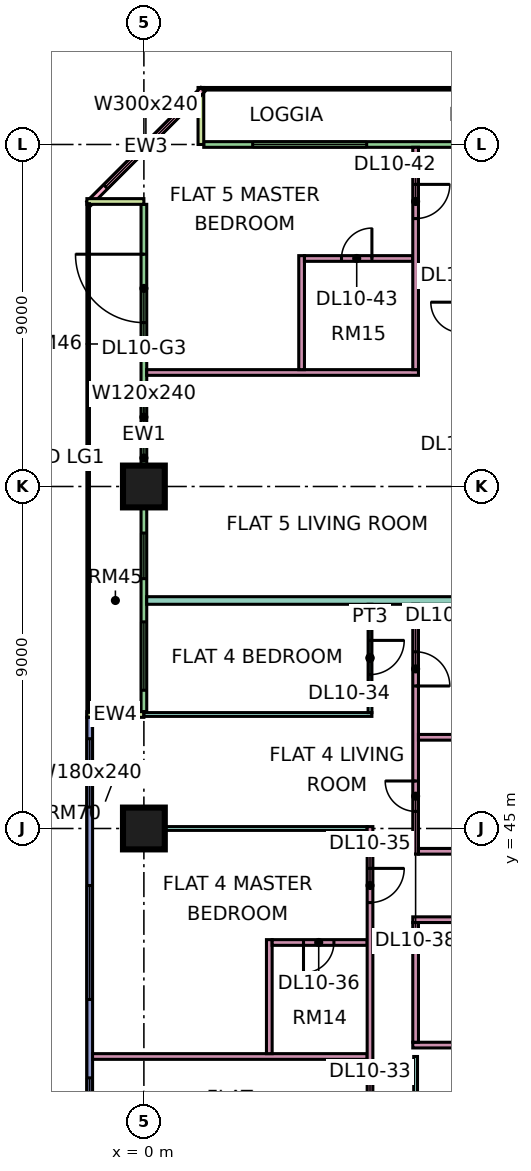
"""IFC4 building model, lengths in metres.
Left out: names, types, materials, properties, quantities, classifications, styles, units other than length and angle.
Written with IfcOpenShell. Run it as: python <this file> out.ifc"""

import sys

from ifc_helpers import new_model, si_unit, direction, frame, frame_2d, origin, origin_2d, place, context, subcontext, project, spatial, rectangle, extrude, element, fill, save


model = new_model("IFC4")
c1 = context("Model", 3, precision=1e-05, world=origin(), true_north=direction((0.0, 1.0)))
c2 = subcontext(c1, "Body", "Model", "MODEL_VIEW")
j1 = project(units=[si_unit("LENGTHUNIT", "METRE"), si_unit("PLANEANGLEUNIT", "RADIAN")], contexts=[c1])
p1 = place(None, origin())
s1 = spatial("IfcSite", under=j1, at=p1, CompositionType="ELEMENT")
p2 = place(p1, origin())
s2 = spatial("IfcBuilding", under=s1, at=p2, CompositionType="ELEMENT")
p3 = place(p2, frame((0.0, 0.0, 52.65)))
s3 = spatial("IfcBuildingStorey", under=s2, at=p3, CompositionType="ELEMENT", Elevation=52.65)
p4 = place(p3, frame((0.0, 45.0, 0.0), z_axis=(0.0, 0.0, 1.0), x_axis=(1.0, 0.0, 0.0)))
e1 = element("IfcColumn", 1, at=p4, inside=s3, PredefinedType="COLUMN", context=c2, shape_type="SweptSolid", body=[
    extrude(rectangle(XDim=1.1, YDim=1.1, at=origin_2d()), origin(), (0.0, 0.0, 1.0), 3.75),
])
p5 = place(p3, frame((0.0, 54.0, 0.0), z_axis=(0.0, 0.0, 1.0), x_axis=(1.0, 0.0, 0.0)))
e2 = element("IfcColumn", 2, at=p5, inside=s3, PredefinedType="COLUMN", context=c2, shape_type="SweptSolid", body=[
    extrude(rectangle(XDim=1.1, YDim=1.1, at=origin_2d()), origin(), (0.0, 0.0, 1.0), 3.75),
])
p6 = place(p3, frame((11.925, 63.0, 0.0), z_axis=(0.0, 0.0, 1.0), x_axis=(-1.0, 0.0, 0.0)))
e3 = element("IfcWall", 3, at=p6, inside=s3, PredefinedType="SOLIDWALL", context=c2, shape_type="SweptSolid", body=[
    extrude(rectangle(XDim=10.35, YDim=0.15, at=frame_2d((5.175, 0.0))), origin(), (0.0, 0.0, 1.0), 3.35),
])
p7 = place(p6, frame((1.775, 0.0, 0.0)))
e4 = element("IfcOpeningElement", 4, at=p7, cuts=e3, PredefinedType="OPENING", context=c2, shape_type="SweptSolid", body=[
    extrude(rectangle(XDim=1.8, YDim=2.4, at=frame_2d((0.9, 1.2))), frame((0.0, 0.085, 0.0), z_axis=(0.0, -1.0, 0.0), x_axis=(1.0, 0.0, 0.0)), (0.0, 0.0, 1.0), 0.17),
])
p8 = place(p6, frame((6.062, 0.0, 0.45)))
e5 = element("IfcOpeningElement", 5, at=p8, cuts=e3, PredefinedType="OPENING", context=c2, shape_type="SweptSolid", body=[
    extrude(rectangle(XDim=3.0, YDim=2.4, at=frame_2d((1.5, 1.2))), frame((0.0, 0.085, 0.0), z_axis=(0.0, -1.0, 0.0), x_axis=(1.0, 0.0, 0.0)), (0.0, 0.0, 1.0), 0.17),
])
p9 = place(p3, frame((1.5, 64.5, 0.0), z_axis=(0.0, 0.0, 1.0), x_axis=(0.0, -1.0, 0.0)))
e6 = element("IfcWall", 6, at=p9, inside=s3, PredefinedType="SOLIDWALL", context=c2, shape_type="SweptSolid", body=[
    extrude(rectangle(XDim=1.5, YDim=0.15, at=frame_2d((0.75, 0.0))), origin(), (0.0, 0.0, 1.0), 3.35),
])
p10 = place(p3, frame((1.553, 64.447, 0.0), z_axis=(0.0, 0.0, 1.0), x_axis=(-0.707106781187, -0.707106781187, 0.0)))
e7 = element("IfcWall", 7, at=p10, inside=s3, PredefinedType="SOLIDWALL", context=c2, shape_type="SweptSolid", body=[
    extrude(rectangle(XDim=4.243, YDim=0.15, at=frame_2d((2.121, 0.0))), origin(), (0.0, 0.0, 1.0), 3.35),
])
p11 = place(p10, frame((0.621, 0.0, 0.45)))
e8 = element("IfcOpeningElement", 8, at=p11, cuts=e7, PredefinedType="OPENING", context=c2, shape_type="SweptSolid", body=[
    extrude(rectangle(XDim=3.0, YDim=2.4, at=frame_2d((1.5, 1.2))), frame((0.0, 0.085, 0.0), z_axis=(0.0, -1.0, 0.0), x_axis=(1.0, 0.0, 0.0)), (0.0, 0.0, 1.0), 0.17),
])
p12 = place(p3, frame((0.0, 61.425, 0.0), z_axis=(0.0, 0.0, 1.0), x_axis=(0.0, -1.0, 0.0)))
e9 = element("IfcWall", 9, at=p12, inside=s3, PredefinedType="SOLIDWALL", context=c2, shape_type="SweptSolid", body=[
    extrude(rectangle(XDim=13.35, YDim=0.15, at=frame_2d((6.675, 0.0))), origin(), (0.0, 0.0, 1.0), 3.35),
])
p13 = place(p12, frame((1.312, 0.0, 0.0)))
e10 = element("IfcOpeningElement", 10, at=p13, cuts=e9, PredefinedType="OPENING", context=c2, shape_type="SweptSolid", body=[
    extrude(rectangle(XDim=1.8, YDim=2.4, at=frame_2d((0.9, 1.2))), frame((0.0, 0.085, 0.0), z_axis=(0.0, -1.0, 0.0), x_axis=(1.0, 0.0, 0.0)), (0.0, 0.0, 1.0), 0.17),
])
p14 = place(p12, frame((5.0, 0.0, 0.45)))
e11 = element("IfcOpeningElement", 11, at=p14, cuts=e9, PredefinedType="OPENING", context=c2, shape_type="SweptSolid", body=[
    extrude(rectangle(XDim=1.2, YDim=2.4, at=frame_2d((0.6, 1.2))), frame((0.0, 0.085, 0.0), z_axis=(0.0, -1.0, 0.0), x_axis=(1.0, 0.0, 0.0)), (0.0, 0.0, 1.0), 0.17),
])
p15 = place(p12, frame((8.65, 0.0, 0.45)))
e12 = element("IfcOpeningElement", 12, at=p15, cuts=e9, PredefinedType="OPENING", context=c2, shape_type="SweptSolid", body=[
    extrude(rectangle(XDim=1.2, YDim=2.4, at=frame_2d((0.6, 1.2))), frame((0.0, 0.085, 0.0), z_axis=(0.0, -1.0, 0.0), x_axis=(1.0, 0.0, 0.0)), (0.0, 0.0, 1.0), 0.17),
])
p16 = place(p12, frame((10.988, 0.0, 0.45)))
e13 = element("IfcOpeningElement", 13, at=p16, cuts=e9, PredefinedType="OPENING", context=c2, shape_type="SweptSolid", body=[
    extrude(rectangle(XDim=1.8, YDim=2.4, at=frame_2d((0.9, 1.2))), frame((0.0, 0.085, 0.0), z_axis=(0.0, -1.0, 0.0), x_axis=(1.0, 0.0, 0.0)), (0.0, 0.0, 1.0), 0.17),
])
for number, where, z_axis, x_axis in (
    (14, (-1.5, 61.5, 0.0), (0.0, 0.0, 1.0), (1.0, 0.0, 0.0)),
    (15, (-1.5, 48.0, 0.0), (0.0, 0.0, 1.0), (1.0, 0.0, 0.0)),
):
    element("IfcWall", number, at=place(p3, frame(where, z_axis=z_axis, x_axis=x_axis)), inside=s3, PredefinedType="SOLIDWALL", context=c2, shape_type="SweptSolid", body=[
        extrude(rectangle(XDim=1.5, YDim=0.15, at=frame_2d((0.75, 0.0))), origin(), (0.0, 0.0, 1.0), 3.35),
    ])
p17 = place(p3, frame((-1.425, 47.925, 0.0), z_axis=(0.0, 0.0, 1.0), x_axis=(0.0, -1.0, 0.0)))
e16 = element("IfcWall", 16, at=p17, inside=s3, PredefinedType="SOLIDWALL", context=c2, shape_type="SweptSolid", body=[
    extrude(rectangle(XDim=11.85, YDim=0.15, at=frame_2d((5.925, 0.0))), origin(), (0.0, 0.0, 1.0), 3.35),
])
p18 = place(p17, frame((0.562, 0.0, 0.45)))
e17 = element("IfcOpeningElement", 17, at=p18, cuts=e16, PredefinedType="OPENING", context=c2, shape_type="SweptSolid", body=[
    extrude(rectangle(XDim=1.8, YDim=2.4, at=frame_2d((0.9, 1.2))), frame((0.0, 0.085, 0.0), z_axis=(0.0, -1.0, 0.0), x_axis=(1.0, 0.0, 0.0)), (0.0, 0.0, 1.0), 0.17),
])
p19 = place(p17, frame((4.425, 0.0, 0.45)))
e18 = element("IfcOpeningElement", 18, at=p19, cuts=e16, PredefinedType="OPENING", context=c2, shape_type="SweptSolid", body=[
    extrude(rectangle(XDim=3.0, YDim=2.4, at=frame_2d((1.5, 1.2))), frame((0.0, 0.085, 0.0), z_axis=(0.0, -1.0, 0.0), x_axis=(1.0, 0.0, 0.0)), (0.0, 0.0, 1.0), 0.17),
])
p20 = place(p17, frame((9.488, 0.0, 0.45)))
e19 = element("IfcOpeningElement", 19, at=p20, cuts=e16, PredefinedType="OPENING", context=c2, shape_type="SweptSolid", body=[
    extrude(rectangle(XDim=1.8, YDim=2.4, at=frame_2d((0.9, 1.2))), frame((0.0, 0.085, 0.0), z_axis=(0.0, -1.0, 0.0), x_axis=(1.0, 0.0, 0.0)), (0.0, 0.0, 1.0), 0.17),
])
p21 = place(p3, frame((-1.351, 39.0, 0.0), z_axis=(0.0, 0.0, 1.0), x_axis=(1.0, 0.0, 0.0)))
e20 = element("IfcWall", 20, at=p21, inside=s3, PredefinedType="PARTITIONING", context=c2, shape_type="SweptSolid", body=[
    extrude(rectangle(XDim=7.226, YDim=0.15, at=frame_2d((3.613, 0.0))), origin(), (0.0, 0.0, 1.0), 3.35),
])
e21 = element("IfcWall", 21, at=p4, inside=s3, PredefinedType="PARTITIONING", context=c2, shape_type="SweptSolid", body=[
    extrude(rectangle(XDim=5.875, YDim=0.1, at=frame_2d((2.938, 0.0))), origin(), (0.0, 0.0, 1.0), 3.35),
])
p22 = place(p3, frame((0.0, 48.0, 0.0), z_axis=(0.0, 0.0, 1.0), x_axis=(1.0, 0.0, 0.0)))
e22 = element("IfcWall", 22, at=p22, inside=s3, PredefinedType="PARTITIONING", context=c2, shape_type="SweptSolid", body=[
    extrude(rectangle(XDim=6.0, YDim=0.1, at=frame_2d((3.0, 0.0))), origin(), (0.0, 0.0, 1.0), 3.35),
])
p23 = place(p3, frame((0.074, 51.0, 0.0), z_axis=(0.0, 0.0, 1.0), x_axis=(1.0, 0.0, 0.0)))
e23 = element("IfcWall", 23, at=p23, inside=s3, PredefinedType="PARTITIONING", context=c2, shape_type="SweptSolid", body=[
    extrude(rectangle(XDim=12.376, YDim=0.2, at=frame_2d((6.188, 0.0))), origin(), (0.0, 0.0, 1.0), 3.35),
])
p24 = place(p3, frame((0.074, 57.0, 0.0), z_axis=(0.0, 0.0, 1.0), x_axis=(1.0, 0.0, 0.0)))
e24 = element("IfcWall", 24, at=p24, inside=s3, PredefinedType="PARTITIONING", context=c2, shape_type="SweptSolid", body=[
    extrude(rectangle(XDim=7.151, YDim=0.15, at=frame_2d((3.576, 0.0))), origin(), (0.0, 0.0, 1.0), 3.35),
])
p25 = place(p3, frame((3.3, 39.075, 0.0), z_axis=(0.0, 0.0, 1.0), x_axis=(0.0, 1.0, 0.0)))
e25 = element("IfcWall", 25, at=p25, inside=s3, PredefinedType="PARTITIONING", context=c2, shape_type="SweptSolid", body=[
    extrude(rectangle(XDim=3.0, YDim=0.15, at=frame_2d((1.5, 0.0))), origin(), (0.0, 0.0, 1.0), 3.35),
])
p26 = place(p3, frame((3.375, 42.0, 0.0), z_axis=(0.0, 0.0, 1.0), x_axis=(1.0, 0.0, 0.0)))
e26 = element("IfcWall", 26, at=p26, inside=s3, PredefinedType="PARTITIONING", context=c2, shape_type="SweptSolid", body=[
    extrude(rectangle(XDim=2.5, YDim=0.15, at=frame_2d((1.25, 0.0))), origin(), (0.0, 0.0, 1.0), 3.35),
])
p27 = place(p26, frame((0.825, 0.0, 0.0)))
e27 = element("IfcOpeningElement", 27, at=p27, cuts=e26, PredefinedType="OPENING", context=c2, shape_type="SweptSolid", body=[
    extrude(rectangle(XDim=0.8, YDim=2.1, at=frame_2d((0.4, 1.05))), frame((0.0, 0.085, 0.0), z_axis=(0.0, -1.0, 0.0), x_axis=(1.0, 0.0, 0.0)), (0.0, 0.0, 1.0), 0.17),
])
p28 = place(p3, frame((4.15, 57.075, 0.0), z_axis=(0.0, 0.0, 1.0), x_axis=(0.0, 1.0, 0.0)))
e28 = element("IfcWall", 28, at=p28, inside=s3, PredefinedType="PARTITIONING", context=c2, shape_type="SweptSolid", body=[
    extrude(rectangle(XDim=3.0, YDim=0.15, at=frame_2d((1.5, 0.0))), origin(), (0.0, 0.0, 1.0), 3.35),
])
p29 = place(p3, frame((4.225, 60.0, 0.0), z_axis=(0.0, 0.0, 1.0), x_axis=(1.0, 0.0, 0.0)))
e29 = element("IfcWall", 29, at=p29, inside=s3, PredefinedType="PARTITIONING", context=c2, shape_type="SweptSolid", body=[
    extrude(rectangle(XDim=2.85, YDim=0.15, at=frame_2d((1.425, 0.0))), origin(), (0.0, 0.0, 1.0), 3.35),
])
p30 = place(p29, frame((0.975, 0.0, 0.0)))
e30 = element("IfcOpeningElement", 30, at=p30, cuts=e29, PredefinedType="OPENING", context=c2, shape_type="SweptSolid", body=[
    extrude(rectangle(XDim=0.8, YDim=2.1, at=frame_2d((0.4, 1.05))), frame((0.0, 0.085, 0.0), z_axis=(0.0, -1.0, 0.0), x_axis=(1.0, 0.0, 0.0)), (0.0, 0.0, 1.0), 0.17),
])
p31 = place(p3, frame((5.95, 36.1, 0.0), z_axis=(0.0, 0.0, 1.0), x_axis=(0.0, 1.0, 0.0)))
e31 = element("IfcWall", 31, at=p31, inside=s3, PredefinedType="PARTITIONING", context=c2, shape_type="SweptSolid", body=[
    extrude(rectangle(XDim=8.95, YDim=0.15, at=frame_2d((4.475, 0.0))), origin(), (0.0, 0.0, 1.0), 3.35),
])
p32 = place(p31, frame((0.95, 0.0, 0.0)))
e32 = element("IfcOpeningElement", 32, at=p32, cuts=e31, PredefinedType="OPENING", context=c2, shape_type="SweptSolid", body=[
    extrude(rectangle(XDim=0.9, YDim=2.1, at=frame_2d((0.45, 1.05))), frame((0.0, 0.085, 0.0), z_axis=(0.0, -1.0, 0.0), x_axis=(1.0, 0.0, 0.0)), (0.0, 0.0, 1.0), 0.17),
])
p33 = place(p31, frame((6.95, 0.0, 0.0)))
e33 = element("IfcOpeningElement", 33, at=p33, cuts=e31, PredefinedType="OPENING", context=c2, shape_type="SweptSolid", body=[
    extrude(rectangle(XDim=0.9, YDim=2.1, at=frame_2d((0.45, 1.05))), frame((0.0, 0.085, 0.0), z_axis=(0.0, -1.0, 0.0), x_axis=(1.0, 0.0, 0.0)), (0.0, 0.0, 1.0), 0.17),
])
p34 = place(p3, frame((5.95, 48.05, 0.0), z_axis=(0.0, 0.0, 1.0), x_axis=(0.0, 1.0, 0.0)))
e34 = element("IfcWall", 34, at=p34, inside=s3, PredefinedType="PARTITIONING", context=c2, shape_type="SweptSolid", body=[
    extrude(rectangle(XDim=2.85, YDim=0.1, at=frame_2d((1.425, 0.0))), origin(), (0.0, 0.0, 1.0), 3.35),
])
p35 = place(p34, frame((1.0, 0.0, 0.0)))
e35 = element("IfcOpeningElement", 35, at=p35, cuts=e34, PredefinedType="OPENING", context=c2, shape_type="SweptSolid", body=[
    extrude(rectangle(XDim=0.9, YDim=2.1, at=frame_2d((0.45, 1.05))), frame((0.0, 0.06, 0.0), z_axis=(0.0, -1.0, 0.0), x_axis=(1.0, 0.0, 0.0)), (0.0, 0.0, 1.0), 0.12),
])
p36 = place(p3, frame((7.075, 39.3, 0.0), z_axis=(0.0, 0.0, 1.0), x_axis=(1.0, 0.0, 0.0)))
e36 = element("IfcWall", 36, at=p36, inside=s3, PredefinedType="PARTITIONING", context=c2, shape_type="SweptSolid", body=[
    extrude(rectangle(XDim=5.375, YDim=0.15, at=frame_2d((2.688, 0.0))), origin(), (0.0, 0.0, 1.0), 3.35),
])
p37 = place(p3, frame((7.075, 42.6, 0.0), z_axis=(0.0, 0.0, 1.0), x_axis=(1.0, 0.0, 0.0)))
e37 = element("IfcWall", 37, at=p37, inside=s3, PredefinedType="PARTITIONING", context=c2, shape_type="SweptSolid", body=[
    extrude(rectangle(XDim=5.375, YDim=0.15, at=frame_2d((2.688, 0.0))), origin(), (0.0, 0.0, 1.0), 3.35),
])
p38 = place(p37, frame((2.425, 0.0, 0.0)))
e38 = element("IfcOpeningElement", 38, at=p38, cuts=e37, PredefinedType="OPENING", context=c2, shape_type="SweptSolid", body=[
    extrude(rectangle(XDim=0.8, YDim=2.1, at=frame_2d((0.4, 1.05))), frame((0.0, 0.085, 0.0), z_axis=(0.0, -1.0, 0.0), x_axis=(1.0, 0.0, 0.0)), (0.0, 0.0, 1.0), 0.17),
])
p39 = place(p3, frame((7.15, 36.1, 0.0), z_axis=(0.0, 0.0, 1.0), x_axis=(0.0, 1.0, 0.0)))
e39 = element("IfcWall", 39, at=p39, inside=s3, PredefinedType="PARTITIONING", context=c2, shape_type="SweptSolid", body=[
    extrude(rectangle(XDim=2.9, YDim=0.1, at=frame_2d((1.45, 0.0))), origin(), (0.0, 0.0, 1.0), 3.35),
])
p40 = place(p39, frame((0.95, 0.0, 0.0)))
e40 = element("IfcOpeningElement", 40, at=p40, cuts=e39, PredefinedType="OPENING", context=c2, shape_type="SweptSolid", body=[
    extrude(rectangle(XDim=0.9, YDim=2.1, at=frame_2d((0.45, 1.05))), frame((0.0, 0.06, 0.0), z_axis=(0.0, -1.0, 0.0), x_axis=(1.0, 0.0, 0.0)), (0.0, 0.0, 1.0), 0.12),
])
p41 = place(p3, frame((7.15, 39.375, 0.0), z_axis=(0.0, 0.0, 1.0), x_axis=(0.0, 1.0, 0.0)))
e41 = element("IfcWall", 41, at=p41, inside=s3, PredefinedType="PARTITIONING", context=c2, shape_type="SweptSolid", body=[
    extrude(rectangle(XDim=3.15, YDim=0.15, at=frame_2d((1.575, 0.0))), origin(), (0.0, 0.0, 1.0), 3.35),
])
p42 = place(p3, frame((7.15, 44.325, 0.0), z_axis=(0.0, 0.0, 1.0), x_axis=(0.0, 1.0, 0.0)))
e42 = element("IfcWall", 42, at=p42, inside=s3, PredefinedType="PARTITIONING", context=c2, shape_type="SweptSolid", body=[
    extrude(rectangle(XDim=6.575, YDim=0.15, at=frame_2d((3.288, 0.0))), origin(), (0.0, 0.0, 1.0), 3.35),
])
p43 = place(p42, frame((4.425, 0.0, 0.0)))
e43 = element("IfcOpeningElement", 43, at=p43, cuts=e42, PredefinedType="OPENING", context=c2, shape_type="SweptSolid", body=[
    extrude(rectangle(XDim=0.9, YDim=2.1, at=frame_2d((0.45, 1.05))), frame((0.0, 0.085, 0.0), z_axis=(0.0, -1.0, 0.0), x_axis=(1.0, 0.0, 0.0)), (0.0, 0.0, 1.0), 0.17),
])
p44 = place(p42, frame((1.125, 0.0, 0.0)))
e44 = element("IfcOpeningElement", 44, at=p44, cuts=e42, PredefinedType="OPENING", context=c2, shape_type="SweptSolid", body=[
    extrude(rectangle(XDim=0.8, YDim=2.1, at=frame_2d((0.4, 1.05))), frame((0.0, 0.085, 0.0), z_axis=(0.0, -1.0, 0.0), x_axis=(1.0, 0.0, 0.0)), (0.0, 0.0, 1.0), 0.17),
])
p45 = place(p3, frame((7.15, 57.075, 0.0), z_axis=(0.0, 0.0, 1.0), x_axis=(0.0, 1.0, 0.0)))
e45 = element("IfcWall", 45, at=p45, inside=s3, PredefinedType="PARTITIONING", context=c2, shape_type="SweptSolid", body=[
    extrude(rectangle(XDim=5.851, YDim=0.15, at=frame_2d((2.926, 0.0))), origin(), (0.0, 0.0, 1.0), 3.35),
])
p46 = place(p45, frame((3.975, 0.0, 0.0)))
e46 = element("IfcOpeningElement", 46, at=p46, cuts=e45, PredefinedType="OPENING", context=c2, shape_type="SweptSolid", body=[
    extrude(rectangle(XDim=0.9, YDim=2.1, at=frame_2d((0.45, 1.05))), frame((0.0, 0.085, 0.0), z_axis=(0.0, -1.0, 0.0), x_axis=(1.0, 0.0, 0.0)), (0.0, 0.0, 1.0), 0.17),
])
for number, where, z_axis, x_axis in (
    (47, (7.225, 44.4, 0.0), (0.0, 0.0, 1.0), (1.0, 0.0, 0.0)),
    (48, (7.225, 47.4, 0.0), (0.0, 0.0, 1.0), (1.0, 0.0, 0.0)),
):
    element("IfcWall", number, at=place(p3, frame(where, z_axis=z_axis, x_axis=x_axis)), inside=s3, PredefinedType="PARTITIONING", context=c2, shape_type="SweptSolid", body=[
        extrude(rectangle(XDim=5.225, YDim=0.15, at=frame_2d((2.612, 0.0))), origin(), (0.0, 0.0, 1.0), 3.35),
    ])
p47 = place(p8, origin())
e49 = element("IfcWindow", 49, at=p47, inside=s3, PartitioningType="SINGLE_PANEL", PredefinedType="WINDOW", context=c2, shape_type="SweptSolid", body=[
    extrude(rectangle(XDim=3.0, YDim=2.4, at=frame_2d((1.5, 1.2))), frame((0.0, 0.03, 0.0), z_axis=(0.0, -1.0, 0.0), x_axis=(1.0, 0.0, 0.0)), (0.0, 0.0, 1.0), 0.06),
])
fill(e5, e49)
p48 = place(p11, origin())
e50 = element("IfcWindow", 50, at=p48, inside=s3, PartitioningType="SINGLE_PANEL", PredefinedType="WINDOW", context=c2, shape_type="SweptSolid", body=[
    extrude(rectangle(XDim=3.0, YDim=2.4, at=frame_2d((1.5, 1.2))), frame((0.0, 0.03, 0.0), z_axis=(0.0, -1.0, 0.0), x_axis=(1.0, 0.0, 0.0)), (0.0, 0.0, 1.0), 0.06),
])
fill(e8, e50)
p49 = place(p13, frame((1.8, 0.0, 0.0), z_axis=(0.0, 0.0, 1.0), x_axis=(-1.0, 0.0, 0.0)))
e51 = element("IfcDoor", 51, at=p49, inside=s3, OperationType="DOUBLE_DOOR_SINGLE_SWING", PredefinedType="DOOR", context=c2, shape_type="SweptSolid", body=[
    extrude(rectangle(XDim=1.8, YDim=2.4, at=frame_2d((0.9, 1.2))), frame((0.0, 0.025, 0.0), z_axis=(0.0, -1.0, 0.0), x_axis=(1.0, 0.0, 0.0)), (0.0, 0.0, 1.0), 0.05),
])
fill(e10, e51)
p50 = place(p14, origin())
e52 = element("IfcWindow", 52, at=p50, inside=s3, PartitioningType="SINGLE_PANEL", PredefinedType="WINDOW", context=c2, shape_type="SweptSolid", body=[
    extrude(rectangle(XDim=1.2, YDim=2.4, at=frame_2d((0.6, 1.2))), frame((0.0, 0.03, 0.0), z_axis=(0.0, -1.0, 0.0), x_axis=(1.0, 0.0, 0.0)), (0.0, 0.0, 1.0), 0.06),
])
fill(e11, e52)
p51 = place(p15, origin())
e53 = element("IfcWindow", 53, at=p51, inside=s3, PartitioningType="SINGLE_PANEL", PredefinedType="WINDOW", context=c2, shape_type="SweptSolid", body=[
    extrude(rectangle(XDim=1.2, YDim=2.4, at=frame_2d((0.6, 1.2))), frame((0.0, 0.03, 0.0), z_axis=(0.0, -1.0, 0.0), x_axis=(1.0, 0.0, 0.0)), (0.0, 0.0, 1.0), 0.06),
])
fill(e12, e53)
p52 = place(p16, origin())
e54 = element("IfcWindow", 54, at=p52, inside=s3, PartitioningType="SINGLE_PANEL", PredefinedType="WINDOW", context=c2, shape_type="SweptSolid", body=[
    extrude(rectangle(XDim=1.8, YDim=2.4, at=frame_2d((0.9, 1.2))), frame((0.0, 0.03, 0.0), z_axis=(0.0, -1.0, 0.0), x_axis=(1.0, 0.0, 0.0)), (0.0, 0.0, 1.0), 0.06),
])
fill(e13, e54)
p53 = place(p18, origin())
e55 = element("IfcWindow", 55, at=p53, inside=s3, PartitioningType="SINGLE_PANEL", PredefinedType="WINDOW", context=c2, shape_type="SweptSolid", body=[
    extrude(rectangle(XDim=1.8, YDim=2.4, at=frame_2d((0.9, 1.2))), frame((0.0, 0.03, 0.0), z_axis=(0.0, -1.0, 0.0), x_axis=(1.0, 0.0, 0.0)), (0.0, 0.0, 1.0), 0.06),
])
fill(e17, e55)
p54 = place(p19, origin())
e56 = element("IfcWindow", 56, at=p54, inside=s3, PartitioningType="SINGLE_PANEL", PredefinedType="WINDOW", context=c2, shape_type="SweptSolid", body=[
    extrude(rectangle(XDim=3.0, YDim=2.4, at=frame_2d((1.5, 1.2))), frame((0.0, 0.03, 0.0), z_axis=(0.0, -1.0, 0.0), x_axis=(1.0, 0.0, 0.0)), (0.0, 0.0, 1.0), 0.06),
])
fill(e18, e56)
p55 = place(p20, origin())
e57 = element("IfcWindow", 57, at=p55, inside=s3, PartitioningType="SINGLE_PANEL", PredefinedType="WINDOW", context=c2, shape_type="SweptSolid", body=[
    extrude(rectangle(XDim=1.8, YDim=2.4, at=frame_2d((0.9, 1.2))), frame((0.0, 0.03, 0.0), z_axis=(0.0, -1.0, 0.0), x_axis=(1.0, 0.0, 0.0)), (0.0, 0.0, 1.0), 0.06),
])
fill(e19, e57)
p56 = place(p35, origin())
e58 = element("IfcDoor", 58, at=p56, inside=s3, OperationType="SINGLE_SWING_RIGHT", PredefinedType="DOOR", context=c2, shape_type="SweptSolid", body=[
    extrude(rectangle(XDim=0.9, YDim=2.1, at=frame_2d((0.45, 1.05))), frame((0.0, 0.025, 0.0), z_axis=(0.0, -1.0, 0.0), x_axis=(1.0, 0.0, 0.0)), (0.0, 0.0, 1.0), 0.05),
])
fill(e35, e58)
p57 = place(p33, origin())
e59 = element("IfcDoor", 59, at=p57, inside=s3, OperationType="SINGLE_SWING_RIGHT", PredefinedType="DOOR", context=c2, shape_type="SweptSolid", body=[
    extrude(rectangle(XDim=0.9, YDim=2.1, at=frame_2d((0.45, 1.05))), frame((0.0, 0.025, 0.0), z_axis=(0.0, -1.0, 0.0), x_axis=(1.0, 0.0, 0.0)), (0.0, 0.0, 1.0), 0.05),
])
fill(e33, e59)
p58 = place(p27, frame((0.8, 0.0, 0.0), z_axis=(0.0, 0.0, 1.0), x_axis=(-1.0, 0.0, 0.0)))
e60 = element("IfcDoor", 60, at=p58, inside=s3, OperationType="SINGLE_SWING_LEFT", PredefinedType="DOOR", context=c2, shape_type="SweptSolid", body=[
    extrude(rectangle(XDim=0.8, YDim=2.1, at=frame_2d((0.4, 1.05))), frame((0.0, 0.025, 0.0), z_axis=(0.0, -1.0, 0.0), x_axis=(1.0, 0.0, 0.0)), (0.0, 0.0, 1.0), 0.05),
])
fill(e27, e60)
p59 = place(p43, frame((0.9, 0.0, 0.0), z_axis=(0.0, 0.0, 1.0), x_axis=(-1.0, 0.0, 0.0)))
e61 = element("IfcDoor", 61, at=p59, inside=s3, OperationType="SINGLE_SWING_LEFT", PredefinedType="DOOR", context=c2, shape_type="SweptSolid", body=[
    extrude(rectangle(XDim=0.9, YDim=2.1, at=frame_2d((0.45, 1.05))), frame((0.0, 0.025, 0.0), z_axis=(0.0, -1.0, 0.0), x_axis=(1.0, 0.0, 0.0)), (0.0, 0.0, 1.0), 0.05),
])
fill(e43, e61)
p60 = place(p44, frame((0.8, 0.0, 0.0), z_axis=(0.0, 0.0, 1.0), x_axis=(-1.0, 0.0, 0.0)))
e62 = element("IfcDoor", 62, at=p60, inside=s3, OperationType="SINGLE_SWING_RIGHT", PredefinedType="DOOR", context=c2, shape_type="SweptSolid", body=[
    extrude(rectangle(XDim=0.8, YDim=2.1, at=frame_2d((0.4, 1.05))), frame((0.0, 0.025, 0.0), z_axis=(0.0, -1.0, 0.0), x_axis=(1.0, 0.0, 0.0)), (0.0, 0.0, 1.0), 0.05),
])
fill(e44, e62)
p61 = place(p46, origin())
e63 = element("IfcDoor", 63, at=p61, inside=s3, OperationType="SINGLE_SWING_RIGHT", PredefinedType="DOOR", context=c2, shape_type="SweptSolid", body=[
    extrude(rectangle(XDim=0.9, YDim=2.1, at=frame_2d((0.45, 1.05))), frame((0.0, 0.025, 0.0), z_axis=(0.0, -1.0, 0.0), x_axis=(1.0, 0.0, 0.0)), (0.0, 0.0, 1.0), 0.05),
])
fill(e46, e63)
p62 = place(p30, frame((0.8, 0.0, 0.0), z_axis=(0.0, 0.0, 1.0), x_axis=(-1.0, 0.0, 0.0)))
e64 = element("IfcDoor", 64, at=p62, inside=s3, OperationType="SINGLE_SWING_RIGHT", PredefinedType="DOOR", context=c2, shape_type="SweptSolid", body=[
    extrude(rectangle(XDim=0.8, YDim=2.1, at=frame_2d((0.4, 1.05))), frame((0.0, 0.025, 0.0), z_axis=(0.0, -1.0, 0.0), x_axis=(1.0, 0.0, 0.0)), (0.0, 0.0, 1.0), 0.05),
])
fill(e30, e64)
save(model, sys.argv[1])
